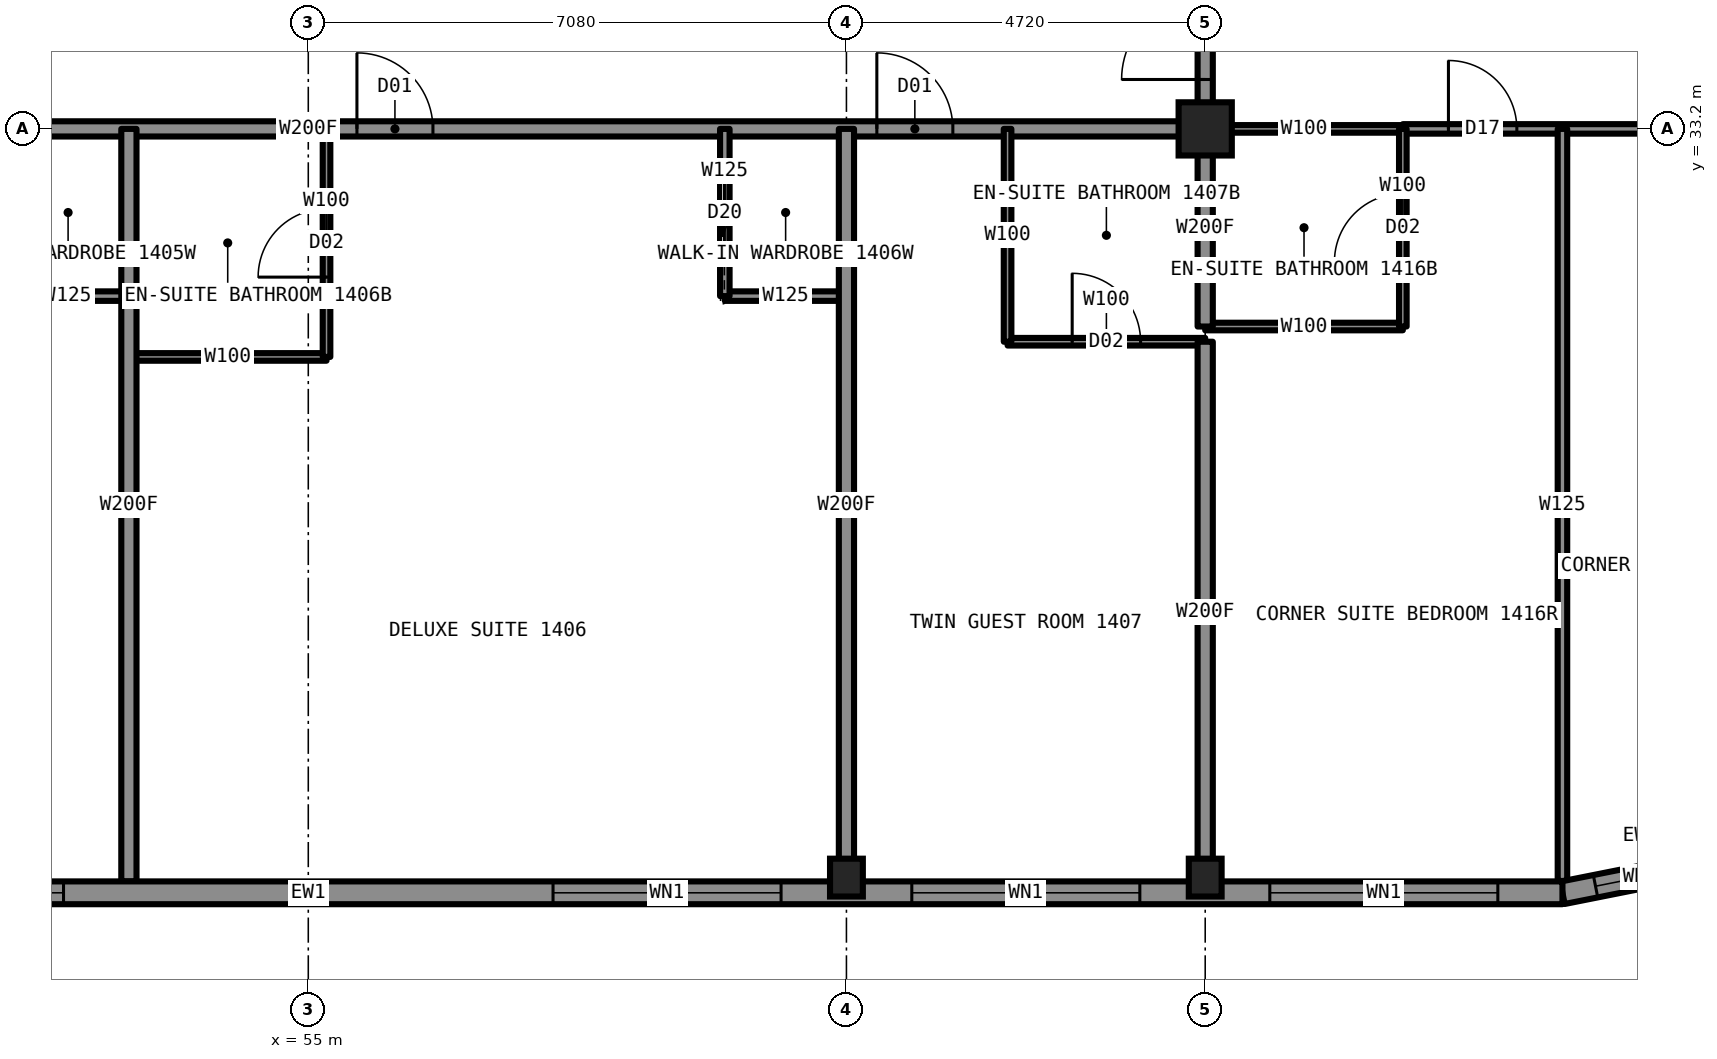
"""IFC4 building model, lengths in metres.
Left out: names, types, materials, properties, quantities, classifications, styles, units other than length and angle.
Written with IfcOpenShell. Run it as: python <this file> out.ifc"""

import sys

from ifc_helpers import new_model, si_unit, direction, frame, frame_2d, origin, origin_2d, place, context, subcontext, project, spatial, rectangle, hollow_rectangle, i_section, extrude, element, fill, save


model = new_model("IFC4")
c1 = context("Model", 3, precision=1e-05, world=origin(), true_north=direction((0.0, 1.0)))
c2 = subcontext(c1, "Body", "Model", "MODEL_VIEW")
j1 = project(units=[si_unit("LENGTHUNIT", "METRE"), si_unit("PLANEANGLEUNIT", "RADIAN")], contexts=[c1])
p1 = place(None, origin())
s1 = spatial("IfcSite", under=j1, at=p1, CompositionType="ELEMENT")
p2 = place(p1, origin())
s2 = spatial("IfcBuilding", under=s1, at=p2, CompositionType="ELEMENT")
p3 = place(p2, frame((0.0, 0.0, 49.5)))
s3 = spatial("IfcBuildingStorey", under=s2, at=p3, CompositionType="ELEMENT", Elevation=49.5)
for number, where, z_axis, x_axis in (
    (1, (62.08, 23.35, 0.0), (0.0, 0.0, 1.0), (1.0, 0.0, 0.0)),
    (2, (66.8, 23.35, 0.0), (0.0, 0.0, 1.0), (1.0, 0.0, 0.0)),
):
    element("IfcColumn", number, at=place(p3, frame(where, z_axis=z_axis, x_axis=x_axis)), inside=s3, PredefinedType="COLUMN", context=c2, shape_type="SweptSolid", body=[
        extrude(i_section(OverallWidth=0.432, OverallDepth=0.498, WebThickness=0.056, FlangeThickness=0.089, at=origin_2d()), origin(), (0.0, 0.0, 1.0), 3.5),
    ])
p4 = place(p3, frame((66.8, 33.2, 0.0), z_axis=(0.0, 0.0, 1.0), x_axis=(1.0, 0.0, 0.0)))
e3 = element("IfcColumn", 3, at=p4, inside=s3, PredefinedType="COLUMN", context=c2, shape_type="SweptSolid", body=[
    extrude(hollow_rectangle(XDim=0.7, YDim=0.7, WallThickness=0.06, at=origin_2d()), origin(), (0.0, 0.0, 1.0), 3.5),
])
p5 = place(p3, frame((66.8, 33.2, 0.0), z_axis=(0.0, 0.0, 1.0), x_axis=(1.0, 0.0, 0.0)))
e4 = element("IfcWall", 4, at=p5, inside=s3, PredefinedType="PARTITIONING", context=c2, shape_type="SweptSolid", body=[
    extrude(rectangle(XDim=2.6, YDim=0.1, at=frame_2d((1.3, 0.0))), origin(), (0.0, 0.0, 1.0), 2.573),
])
p6 = place(p3, frame((43.2, 33.2, 0.0), z_axis=(0.0, 0.0, 1.0), x_axis=(1.0, 0.0, 0.0)))
e5 = element("IfcWall", 5, at=p6, inside=s3, PredefinedType="PARTITIONING", context=c2, shape_type="SweptSolid", body=[
    extrude(rectangle(XDim=23.6, YDim=0.2, at=frame_2d((11.8, 0.0))), origin(), (0.0, 0.0, 1.0), 3.33),
])
p7 = place(p6, frame((3.0, 0.0, 0.0)))
e6 = element("IfcOpeningElement", 6, at=p7, cuts=e5, PredefinedType="OPENING", context=c2, shape_type="SweptSolid", body=[
    extrude(rectangle(XDim=1.0, YDim=2.2, at=frame_2d((0.5, 1.1))), frame((0.0, 0.11, 0.0), z_axis=(0.0, -1.0, 0.0), x_axis=(1.0, 0.0, 0.0)), (0.0, 0.0, 1.0), 0.22),
])
p8 = place(p6, frame((12.44, 0.0, 0.0)))
e7 = element("IfcOpeningElement", 7, at=p8, cuts=e5, PredefinedType="OPENING", context=c2, shape_type="SweptSolid", body=[
    extrude(rectangle(XDim=1.0, YDim=2.2, at=frame_2d((0.5, 1.1))), frame((0.0, 0.11, 0.0), z_axis=(0.0, -1.0, 0.0), x_axis=(1.0, 0.0, 0.0)), (0.0, 0.0, 1.0), 0.22),
])
p9 = place(p6, frame((19.28, 0.0, 0.0)))
e8 = element("IfcOpeningElement", 8, at=p9, cuts=e5, PredefinedType="OPENING", context=c2, shape_type="SweptSolid", body=[
    extrude(rectangle(XDim=1.0, YDim=2.2, at=frame_2d((0.5, 1.1))), frame((0.0, 0.11, 0.0), z_axis=(0.0, -1.0, 0.0), x_axis=(1.0, 0.0, 0.0)), (0.0, 0.0, 1.0), 0.22),
])
p10 = place(p3, frame((69.4, 33.2, 0.0), z_axis=(0.0, 0.0, 1.0), x_axis=(1.0, 0.0, 0.0)))
e9 = element("IfcWall", 9, at=p10, inside=s3, PredefinedType="PARTITIONING", context=c2, shape_type="SweptSolid", body=[
    extrude(rectangle(XDim=7.3, YDim=0.125, at=frame_2d((3.65, 0.0))), origin(), (0.0, 0.0, 1.0), 2.573),
])
p11 = place(p10, frame((0.6, 0.0, 0.0)))
e10 = element("IfcOpeningElement", 10, at=p11, cuts=e9, PredefinedType="OPENING", context=c2, shape_type="SweptSolid", body=[
    extrude(rectangle(XDim=0.9, YDim=2.2, at=frame_2d((0.45, 1.1))), frame((0.0, 0.073, 0.0), z_axis=(0.0, -1.0, 0.0), x_axis=(1.0, 0.0, 0.0)), (0.0, 0.0, 1.0), 0.145),
])
p12 = place(p10, frame((4.4, 0.0, 0.0)))
e11 = element("IfcOpeningElement", 11, at=p12, cuts=e9, PredefinedType="OPENING", context=c2, shape_type="SweptSolid", body=[
    extrude(rectangle(XDim=0.9, YDim=2.2, at=frame_2d((0.45, 1.1))), frame((0.0, 0.073, 0.0), z_axis=(0.0, -1.0, 0.0), x_axis=(1.0, 0.0, 0.0)), (0.0, 0.0, 1.0), 0.145),
])
p13 = place(p3, frame((51.04, 31.0, 0.0), z_axis=(0.0, 0.0, 1.0), x_axis=(1.0, 0.0, 0.0)))
e12 = element("IfcWall", 12, at=p13, inside=s3, PredefinedType="PARTITIONING", context=c2, shape_type="SweptSolid", body=[
    extrude(rectangle(XDim=1.6, YDim=0.125, at=frame_2d((0.8, 0.0))), origin(), (0.0, 0.0, 1.0), 3.33),
])
p14 = place(p3, frame((60.48, 31.0, 0.0), z_axis=(0.0, 0.0, 1.0), x_axis=(1.0, 0.0, 0.0)))
e13 = element("IfcWall", 13, at=p14, inside=s3, PredefinedType="PARTITIONING", context=c2, shape_type="SweptSolid", body=[
    extrude(rectangle(XDim=1.6, YDim=0.125, at=frame_2d((0.8, 0.0))), origin(), (0.0, 0.0, 1.0), 3.33),
])
p15 = place(p3, frame((66.8, 30.6, 0.0), z_axis=(0.0, 0.0, 1.0), x_axis=(1.0, 0.0, 0.0)))
e14 = element("IfcWall", 14, at=p15, inside=s3, PredefinedType="PARTITIONING", context=c2, shape_type="SweptSolid", body=[
    extrude(rectangle(XDim=2.6, YDim=0.1, at=frame_2d((1.3, 0.0))), origin(), (0.0, 0.0, 1.0), 3.33),
])
p16 = place(p3, frame((64.2, 30.4, 0.0), z_axis=(0.0, 0.0, 1.0), x_axis=(1.0, 0.0, 0.0)))
e15 = element("IfcWall", 15, at=p16, inside=s3, PredefinedType="PARTITIONING", context=c2, shape_type="SweptSolid", body=[
    extrude(rectangle(XDim=2.6, YDim=0.1, at=frame_2d((1.3, 0.0))), origin(), (0.0, 0.0, 1.0), 3.33),
])
p17 = place(p16, frame((0.85, 0.0, 0.0)))
e16 = element("IfcOpeningElement", 16, at=p17, cuts=e15, PredefinedType="OPENING", context=c2, shape_type="SweptSolid", body=[
    extrude(rectangle(XDim=0.9, YDim=2.1, at=frame_2d((0.45, 1.05))), frame((0.0, 0.06, 0.0), z_axis=(0.0, -1.0, 0.0), x_axis=(1.0, 0.0, 0.0)), (0.0, 0.0, 1.0), 0.12),
])
p18 = place(p3, frame((52.64, 30.2, 0.0), z_axis=(0.0, 0.0, 1.0), x_axis=(1.0, 0.0, 0.0)))
e17 = element("IfcWall", 17, at=p18, inside=s3, PredefinedType="PARTITIONING", context=c2, shape_type="SweptSolid", body=[
    extrude(rectangle(XDim=2.6, YDim=0.1, at=frame_2d((1.3, 0.0))), origin(), (0.0, 0.0, 1.0), 3.33),
])
p19 = place(p3, frame((52.64, 23.3, 0.0), z_axis=(0.0, 0.0, 1.0), x_axis=(0.0, 1.0, 0.0)))
e18 = element("IfcWall", 18, at=p19, inside=s3, PredefinedType="PARTITIONING", context=c2, shape_type="SweptSolid", body=[
    extrude(rectangle(XDim=9.9, YDim=0.2, at=frame_2d((4.95, 0.0))), origin(), (0.0, 0.0, 1.0), 3.33),
])
p20 = place(p3, frame((55.24, 30.2, 0.0), z_axis=(0.0, 0.0, 1.0), x_axis=(0.0, 1.0, 0.0)))
e19 = element("IfcWall", 19, at=p20, inside=s3, PredefinedType="PARTITIONING", context=c2, shape_type="SweptSolid", body=[
    extrude(rectangle(XDim=3.0, YDim=0.1, at=frame_2d((1.5, 0.0))), origin(), (0.0, 0.0, 1.0), 3.33),
])
p21 = place(p20, frame((1.05, 0.0, 0.0)))
e20 = element("IfcOpeningElement", 20, at=p21, cuts=e19, PredefinedType="OPENING", context=c2, shape_type="SweptSolid", body=[
    extrude(rectangle(XDim=0.9, YDim=2.1, at=frame_2d((0.45, 1.05))), frame((0.0, 0.06, 0.0), z_axis=(0.0, -1.0, 0.0), x_axis=(1.0, 0.0, 0.0)), (0.0, 0.0, 1.0), 0.12),
])
p22 = place(p3, frame((66.8, 33.2, 0.0), z_axis=(0.0, 0.0, 1.0), x_axis=(0.0, 1.0, 0.0)))
e21 = element("IfcWall", 21, at=p22, inside=s3, PredefinedType="PARTITIONING", context=c2, shape_type="SweptSolid", body=[
    extrude(rectangle(XDim=4.72, YDim=0.2, at=frame_2d((2.36, 0.0))), origin(), (0.0, 0.0, 1.0), 3.33),
])
p23 = place(p22, frame((0.65, 0.0, 0.0)))
e22 = element("IfcOpeningElement", 22, at=p23, cuts=e21, PredefinedType="OPENING", context=c2, shape_type="SweptSolid", body=[
    extrude(rectangle(XDim=1.1, YDim=2.2, at=frame_2d((0.55, 1.1))), frame((0.0, 0.11, 0.0), z_axis=(0.0, -1.0, 0.0), x_axis=(1.0, 0.0, 0.0)), (0.0, 0.0, 1.0), 0.22),
])
p24 = place(p3, frame((66.8, 23.3, 0.0), z_axis=(0.0, 0.0, 1.0), x_axis=(0.0, 1.0, 0.0)))
e23 = element("IfcWall", 23, at=p24, inside=s3, PredefinedType="PARTITIONING", context=c2, shape_type="SweptSolid", body=[
    extrude(rectangle(XDim=7.1, YDim=0.2, at=frame_2d((3.55, 0.0))), origin(), (0.0, 0.0, 1.0), 2.573),
])
p25 = place(p3, frame((66.8, 30.6, 0.0), z_axis=(0.0, 0.0, 1.0), x_axis=(0.0, 1.0, 0.0)))
e24 = element("IfcWall", 24, at=p25, inside=s3, PredefinedType="PARTITIONING", context=c2, shape_type="SweptSolid", body=[
    extrude(rectangle(XDim=2.6, YDim=0.2, at=frame_2d((1.3, 0.0))), origin(), (0.0, 0.0, 1.0), 2.573),
])
p26 = place(p3, frame((69.4, 30.6, 0.0), z_axis=(0.0, 0.0, 1.0), x_axis=(0.0, 1.0, 0.0)))
e25 = element("IfcWall", 25, at=p26, inside=s3, PredefinedType="PARTITIONING", context=c2, shape_type="SweptSolid", body=[
    extrude(rectangle(XDim=2.6, YDim=0.1, at=frame_2d((1.3, 0.0))), origin(), (0.0, 0.0, 1.0), 3.33),
])
p27 = place(p26, frame((0.85, 0.0, 0.0)))
e26 = element("IfcOpeningElement", 26, at=p27, cuts=e25, PredefinedType="OPENING", context=c2, shape_type="SweptSolid", body=[
    extrude(rectangle(XDim=0.9, YDim=2.1, at=frame_2d((0.45, 1.05))), frame((0.0, 0.06, 0.0), z_axis=(0.0, -1.0, 0.0), x_axis=(1.0, 0.0, 0.0)), (0.0, 0.0, 1.0), 0.12),
])
p28 = place(p3, frame((71.5, 23.306, 0.0), z_axis=(0.0, 0.0, 1.0), x_axis=(0.0, 1.0, 0.0)))
e27 = element("IfcWall", 27, at=p28, inside=s3, PredefinedType="PARTITIONING", context=c2, shape_type="SweptSolid", body=[
    extrude(rectangle(XDim=9.894, YDim=0.125, at=frame_2d((4.947, 0.0))), origin(), (0.0, 0.0, 1.0), 3.33),
])
p29 = place(p3, frame((60.48, 31.0, 0.0), z_axis=(0.0, 0.0, 1.0), x_axis=(0.0, 1.0, 0.0)))
e28 = element("IfcWall", 28, at=p29, inside=s3, PredefinedType="PARTITIONING", context=c2, shape_type="SweptSolid", body=[
    extrude(rectangle(XDim=2.2, YDim=0.125, at=frame_2d((1.1, 0.0))), origin(), (0.0, 0.0, 1.0), 3.33),
])
p30 = place(p29, frame((0.7, 0.0, 0.0)))
e29 = element("IfcOpeningElement", 29, at=p30, cuts=e28, PredefinedType="OPENING", context=c2, shape_type="SweptSolid", body=[
    extrude(rectangle(XDim=0.8, YDim=2.1, at=frame_2d((0.4, 1.05))), frame((0.0, 0.073, 0.0), z_axis=(0.0, -1.0, 0.0), x_axis=(1.0, 0.0, 0.0)), (0.0, 0.0, 1.0), 0.145),
])
p31 = place(p3, frame((62.08, 23.3, 0.0), z_axis=(0.0, 0.0, 1.0), x_axis=(0.0, 1.0, 0.0)))
e30 = element("IfcWall", 30, at=p31, inside=s3, PredefinedType="PARTITIONING", context=c2, shape_type="SweptSolid", body=[
    extrude(rectangle(XDim=9.9, YDim=0.2, at=frame_2d((4.95, 0.0))), origin(), (0.0, 0.0, 1.0), 2.573),
])
p32 = place(p3, frame((64.2, 30.4, 0.0), z_axis=(0.0, 0.0, 1.0), x_axis=(0.0, 1.0, 0.0)))
e31 = element("IfcWall", 31, at=p32, inside=s3, PredefinedType="PARTITIONING", context=c2, shape_type="SweptSolid", body=[
    extrude(rectangle(XDim=2.8, YDim=0.1, at=frame_2d((1.4, 0.0))), origin(), (0.0, 0.0, 1.0), 3.33),
])
p33 = place(p3, frame((71.5, 23.15, 0.0), z_axis=(0.0, 0.0, 1.0), x_axis=(0.980787050784, 0.195081421501, 0.0)))
e32 = element("IfcWall", 32, at=p33, inside=s3, PredefinedType="SOLIDWALL", context=c2, shape_type="SweptSolid", body=[
    extrude(rectangle(XDim=2.087, YDim=0.3, at=frame_2d((1.044, 0.0))), origin(), (0.0, 0.0, 1.0), 3.33),
])
p34 = place(p33, frame((0.444, 0.0, 0.5)))
e33 = element("IfcOpeningElement", 33, at=p34, cuts=e32, PredefinedType="OPENING", context=c2, shape_type="SweptSolid", body=[
    extrude(rectangle(XDim=1.2, YDim=2.0, at=frame_2d((0.6, 1.0))), frame((0.0, 0.16, 0.0), z_axis=(0.0, -1.0, 0.0), x_axis=(1.0, 0.0, 0.0)), (0.0, 0.0, 1.0), 0.32),
])
p35 = place(p3, frame((38.5, 23.15, 0.0), z_axis=(0.0, 0.0, 1.0), x_axis=(1.0, 0.0, 0.0)))
e34 = element("IfcWall", 34, at=p35, inside=s3, PredefinedType="SOLIDWALL", context=c2, shape_type="SweptSolid", body=[
    extrude(rectangle(XDim=33.0, YDim=0.3, at=frame_2d((16.5, 0.0))), origin(), (0.0, 0.0, 1.0), 2.83),
])
p36 = place(p35, frame((0.85, 0.0, 0.5)))
e35 = element("IfcOpeningElement", 35, at=p36, cuts=e34, PredefinedType="OPENING", context=c2, shape_type="SweptSolid", body=[
    extrude(rectangle(XDim=3.0, YDim=2.0, at=frame_2d((1.5, 1.0))), frame((0.0, 0.16, 0.0), z_axis=(0.0, -1.0, 0.0), x_axis=(1.0, 0.0, 0.0)), (0.0, 0.0, 1.0), 0.32),
])
p37 = place(p35, frame((5.56, 0.0, 0.5)))
e36 = element("IfcOpeningElement", 36, at=p37, cuts=e34, PredefinedType="OPENING", context=c2, shape_type="SweptSolid", body=[
    extrude(rectangle(XDim=3.0, YDim=2.0, at=frame_2d((1.5, 1.0))), frame((0.0, 0.16, 0.0), z_axis=(0.0, -1.0, 0.0), x_axis=(1.0, 0.0, 0.0)), (0.0, 0.0, 1.0), 0.32),
])
p38 = place(p35, frame((10.28, 0.0, 1.1)))
e37 = element("IfcOpeningElement", 37, at=p38, cuts=e34, PredefinedType="OPENING", context=c2, shape_type="SweptSolid", body=[
    extrude(rectangle(XDim=1.1, YDim=1.4, at=frame_2d((0.55, 0.7))), frame((0.0, 0.16, 0.0), z_axis=(0.0, -1.0, 0.0), x_axis=(1.0, 0.0, 0.0)), (0.0, 0.0, 1.0), 0.32),
])
p39 = place(p35, frame((15.0, 0.0, 0.5)))
e38 = element("IfcOpeningElement", 38, at=p39, cuts=e34, PredefinedType="OPENING", context=c2, shape_type="SweptSolid", body=[
    extrude(rectangle(XDim=3.0, YDim=2.0, at=frame_2d((1.5, 1.0))), frame((0.0, 0.16, 0.0), z_axis=(0.0, -1.0, 0.0), x_axis=(1.0, 0.0, 0.0)), (0.0, 0.0, 1.0), 0.32),
])
p40 = place(p35, frame((21.62, 0.0, 1.1)))
e39 = element("IfcOpeningElement", 39, at=p40, cuts=e34, PredefinedType="OPENING", context=c2, shape_type="SweptSolid", body=[
    extrude(rectangle(XDim=1.1, YDim=1.4, at=frame_2d((0.55, 0.7))), frame((0.0, 0.16, 0.0), z_axis=(0.0, -1.0, 0.0), x_axis=(1.0, 0.0, 0.0)), (0.0, 0.0, 1.0), 0.32),
])
p41 = place(p35, frame((24.44, 0.0, 0.5)))
e40 = element("IfcOpeningElement", 40, at=p41, cuts=e34, PredefinedType="OPENING", context=c2, shape_type="SweptSolid", body=[
    extrude(rectangle(XDim=3.0, YDim=2.0, at=frame_2d((1.5, 1.0))), frame((0.0, 0.16, 0.0), z_axis=(0.0, -1.0, 0.0), x_axis=(1.0, 0.0, 0.0)), (0.0, 0.0, 1.0), 0.32),
])
p42 = place(p35, frame((29.15, 0.0, 0.5)))
e41 = element("IfcOpeningElement", 41, at=p42, cuts=e34, PredefinedType="OPENING", context=c2, shape_type="SweptSolid", body=[
    extrude(rectangle(XDim=3.0, YDim=2.0, at=frame_2d((1.5, 1.0))), frame((0.0, 0.16, 0.0), z_axis=(0.0, -1.0, 0.0), x_axis=(1.0, 0.0, 0.0)), (0.0, 0.0, 1.0), 0.32),
])
p43 = place(p8, origin())
e42 = element("IfcDoor", 42, at=p43, inside=s3, OperationType="SINGLE_SWING_LEFT", PredefinedType="DOOR", context=c2, shape_type="SweptSolid", body=[
    extrude(rectangle(XDim=1.0, YDim=2.2, at=frame_2d((0.5, 1.1))), frame((0.0, 0.025, 0.0), z_axis=(0.0, -1.0, 0.0), x_axis=(1.0, 0.0, 0.0)), (0.0, 0.0, 1.0), 0.05),
])
fill(e7, e42)
p44 = place(p21, origin())
e43 = element("IfcDoor", 43, at=p44, inside=s3, OperationType="SINGLE_SWING_RIGHT", PredefinedType="DOOR", context=c2, shape_type="SweptSolid", body=[
    extrude(rectangle(XDim=0.9, YDim=2.1, at=frame_2d((0.45, 1.05))), frame((0.0, 0.025, 0.0), z_axis=(0.0, -1.0, 0.0), x_axis=(1.0, 0.0, 0.0)), (0.0, 0.0, 1.0), 0.05),
])
fill(e20, e43)
p45 = place(p30, origin())
e44 = element("IfcDoor", 44, at=p45, inside=s3, OperationType="SLIDING_TO_LEFT", PredefinedType="DOOR", context=c2, shape_type="SweptSolid", body=[
    extrude(rectangle(XDim=0.8, YDim=2.1, at=frame_2d((0.4, 1.05))), frame((0.0, 0.025, 0.0), z_axis=(0.0, -1.0, 0.0), x_axis=(1.0, 0.0, 0.0)), (0.0, 0.0, 1.0), 0.05),
])
fill(e29, e44)
p46 = place(p9, origin())
e45 = element("IfcDoor", 45, at=p46, inside=s3, OperationType="SINGLE_SWING_LEFT", PredefinedType="DOOR", context=c2, shape_type="SweptSolid", body=[
    extrude(rectangle(XDim=1.0, YDim=2.2, at=frame_2d((0.5, 1.1))), frame((0.0, 0.025, 0.0), z_axis=(0.0, -1.0, 0.0), x_axis=(1.0, 0.0, 0.0)), (0.0, 0.0, 1.0), 0.05),
])
fill(e8, e45)
p47 = place(p17, origin())
e46 = element("IfcDoor", 46, at=p47, inside=s3, OperationType="SINGLE_SWING_RIGHT", PredefinedType="DOOR", context=c2, shape_type="SweptSolid", body=[
    extrude(rectangle(XDim=0.9, YDim=2.1, at=frame_2d((0.45, 1.05))), frame((0.0, 0.025, 0.0), z_axis=(0.0, -1.0, 0.0), x_axis=(1.0, 0.0, 0.0)), (0.0, 0.0, 1.0), 0.05),
])
fill(e16, e46)
p48 = place(p23, origin())
e47 = element("IfcDoor", 47, at=p48, inside=s3, OperationType="SINGLE_SWING_LEFT", PredefinedType="DOOR", context=c2, shape_type="SweptSolid", body=[
    extrude(rectangle(XDim=1.1, YDim=2.2, at=frame_2d((0.55, 1.1))), frame((0.0, 0.025, 0.0), z_axis=(0.0, -1.0, 0.0), x_axis=(1.0, 0.0, 0.0)), (0.0, 0.0, 1.0), 0.05),
])
fill(e22, e47)
p49 = place(p27, origin())
e48 = element("IfcDoor", 48, at=p49, inside=s3, OperationType="SINGLE_SWING_RIGHT", PredefinedType="DOOR", context=c2, shape_type="SweptSolid", body=[
    extrude(rectangle(XDim=0.9, YDim=2.1, at=frame_2d((0.45, 1.05))), frame((0.0, 0.025, 0.0), z_axis=(0.0, -1.0, 0.0), x_axis=(1.0, 0.0, 0.0)), (0.0, 0.0, 1.0), 0.05),
])
fill(e26, e48)
p50 = place(p11, origin())
e49 = element("IfcDoor", 49, at=p50, inside=s3, OperationType="SINGLE_SWING_LEFT", PredefinedType="DOOR", context=c2, shape_type="SweptSolid", body=[
    extrude(rectangle(XDim=0.9, YDim=2.2, at=frame_2d((0.45, 1.1))), frame((0.0, 0.025, 0.0), z_axis=(0.0, -1.0, 0.0), x_axis=(1.0, 0.0, 0.0)), (0.0, 0.0, 1.0), 0.05),
])
fill(e10, e49)
p51 = place(p34, origin())
e50 = element("IfcWindow", 50, at=p51, inside=s3, PartitioningType="SINGLE_PANEL", PredefinedType="WINDOW", context=c2, shape_type="SweptSolid", body=[
    extrude(rectangle(XDim=1.2, YDim=2.0, at=frame_2d((0.6, 1.0))), frame((0.0, 0.03, 0.0), z_axis=(0.0, -1.0, 0.0), x_axis=(1.0, 0.0, 0.0)), (0.0, 0.0, 1.0), 0.06),
])
fill(e33, e50)
p52 = place(p39, origin())
e51 = element("IfcWindow", 51, at=p52, inside=s3, PartitioningType="SINGLE_PANEL", PredefinedType="WINDOW", context=c2, shape_type="SweptSolid", body=[
    extrude(rectangle(XDim=3.0, YDim=2.0, at=frame_2d((1.5, 1.0))), frame((0.0, 0.03, 0.0), z_axis=(0.0, -1.0, 0.0), x_axis=(1.0, 0.0, 0.0)), (0.0, 0.0, 1.0), 0.06),
])
fill(e38, e51)
p53 = place(p40, origin())
e52 = element("IfcWindow", 52, at=p53, inside=s3, PartitioningType="SINGLE_PANEL", PredefinedType="WINDOW", context=c2, shape_type="SweptSolid", body=[
    extrude(rectangle(XDim=1.1, YDim=1.4, at=frame_2d((0.55, 0.7))), frame((0.0, 0.03, 0.0), z_axis=(0.0, -1.0, 0.0), x_axis=(1.0, 0.0, 0.0)), (0.0, 0.0, 1.0), 0.06),
])
fill(e39, e52)
p54 = place(p41, origin())
e53 = element("IfcWindow", 53, at=p54, inside=s3, PartitioningType="SINGLE_PANEL", PredefinedType="WINDOW", context=c2, shape_type="SweptSolid", body=[
    extrude(rectangle(XDim=3.0, YDim=2.0, at=frame_2d((1.5, 1.0))), frame((0.0, 0.03, 0.0), z_axis=(0.0, -1.0, 0.0), x_axis=(1.0, 0.0, 0.0)), (0.0, 0.0, 1.0), 0.06),
])
fill(e40, e53)
p55 = place(p42, origin())
e54 = element("IfcWindow", 54, at=p55, inside=s3, PartitioningType="SINGLE_PANEL", PredefinedType="WINDOW", context=c2, shape_type="SweptSolid", body=[
    extrude(rectangle(XDim=3.0, YDim=2.0, at=frame_2d((1.5, 1.0))), frame((0.0, 0.03, 0.0), z_axis=(0.0, -1.0, 0.0), x_axis=(1.0, 0.0, 0.0)), (0.0, 0.0, 1.0), 0.06),
])
fill(e41, e54)
save(model, sys.argv[1])
